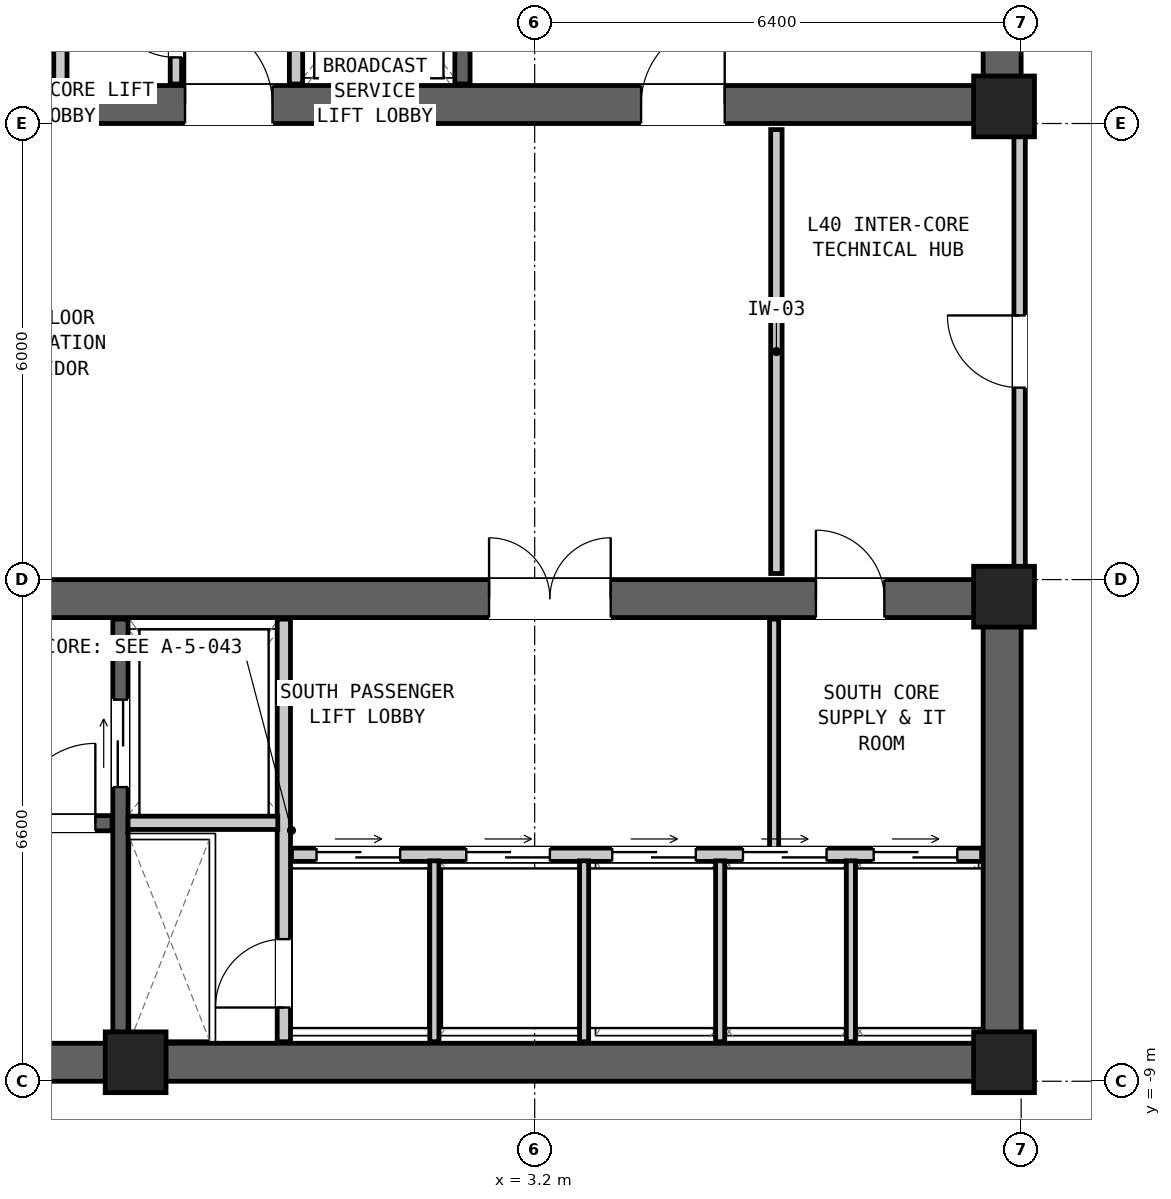
"""IFC4 building model, lengths in metres.
Left out: names, types, materials, properties, quantities, classifications, styles, units other than length and angle.
Written with IfcOpenShell. Run it as: python <this file> out.ifc"""

import sys

from ifc_helpers import new_model, si_unit, direction, frame, frame_2d, origin, origin_2d, place, context, subcontext, project, spatial, rectangle, extrude, element, fill, save


model = new_model("IFC4")
c1 = context("Model", 3, precision=1e-05, world=origin(), true_north=direction((0.0, 1.0)))
c2 = subcontext(c1, "Body", "Model", "MODEL_VIEW")
j1 = project(units=[si_unit("LENGTHUNIT", "METRE"), si_unit("PLANEANGLEUNIT", "RADIAN")], contexts=[c1])
p1 = place(None, origin())
s1 = spatial("IfcSite", under=j1, at=p1, CompositionType="ELEMENT")
p2 = place(p1, origin())
s2 = spatial("IfcBuilding", under=s1, at=p2, CompositionType="ELEMENT")
p3 = place(p2, frame((0.0, 0.0, 137.2)))
s3 = spatial("IfcBuildingStorey", under=s2, at=p3, CompositionType="ELEMENT", Elevation=137.2)
p4 = place(p3, frame((-9.6, 3.85, 0.0), z_axis=(0.0, 0.0, 1.0), x_axis=(1.0, 0.0, 0.0)))
e1 = element("IfcWall", 1, at=p4, inside=s3, PredefinedType="SHEAR", context=c2, shape_type="SweptSolid", body=[
    extrude(rectangle(XDim=19.2, YDim=0.5, at=frame_2d((9.6, 0.0))), origin(), (0.0, 0.0, 1.0), 3.05),
])
p5 = place(p4, frame((14.2, 0.0, 0.0)))
e2 = element("IfcOpeningElement", 2, at=p5, cuts=e1, PredefinedType="OPENING", context=c2, shape_type="SweptSolid", body=[
    extrude(rectangle(XDim=1.1, YDim=2.08, at=frame_2d((0.55, 1.04))), frame((0.0, 0.262, 0.0), z_axis=(0.0, -1.0, 0.0), x_axis=(1.0, 0.0, 0.0)), (0.0, 0.0, 1.0), 0.524),
])
p6 = place(p4, frame((8.2, 0.0, 0.0)))
e3 = element("IfcOpeningElement", 3, at=p6, cuts=e1, PredefinedType="OPENING", context=c2, shape_type="SweptSolid", body=[
    extrude(rectangle(XDim=1.15, YDim=2.1, at=frame_2d((0.575, 1.05))), frame((0.0, 0.262, 0.0), z_axis=(0.0, -1.0, 0.0), x_axis=(1.0, 0.0, 0.0)), (0.0, 0.0, 1.0), 0.524),
])
p7 = place(p4, frame((2.5, 0.0, 0.0)))
e4 = element("IfcOpeningElement", 4, at=p7, cuts=e1, PredefinedType="OPENING", context=c2, shape_type="SweptSolid", body=[
    extrude(rectangle(XDim=1.6, YDim=2.12, at=frame_2d((0.8, 1.06))), frame((0.0, 0.262, 0.0), z_axis=(0.0, -1.0, 0.0), x_axis=(1.0, 0.0, 0.0)), (0.0, 0.0, 1.0), 0.524),
])
p8 = place(p3, frame((9.35, 3.6, 0.0), z_axis=(0.0, 0.0, 1.0), x_axis=(0.0, 1.0, 0.0)))
e5 = element("IfcWall", 5, at=p8, inside=s3, PredefinedType="SHEAR", context=c2, shape_type="SweptSolid", body=[
    extrude(rectangle(XDim=6.6, YDim=0.5, at=frame_2d((3.3, 0.0))), origin(), (0.0, 0.0, 1.0), 3.05),
])
p9 = place(p3, frame((-9.6, -8.75, 0.0), z_axis=(0.0, 0.0, 1.0), x_axis=(1.0, 0.0, 0.0)))
e6 = element("IfcWall", 6, at=p9, inside=s3, PredefinedType="SHEAR", context=c2, shape_type="SweptSolid", body=[
    extrude(rectangle(XDim=19.2, YDim=0.5, at=frame_2d((9.6, 0.0))), origin(), (0.0, 0.0, 1.0), 3.05),
])
p10 = place(p3, frame((-9.6, -2.65, 0.0), z_axis=(0.0, 0.0, 1.0), x_axis=(1.0, 0.0, 0.0)))
e7 = element("IfcWall", 7, at=p10, inside=s3, PredefinedType="SHEAR", context=c2, shape_type="SweptSolid", body=[
    extrude(rectangle(XDim=19.2, YDim=0.5, at=frame_2d((9.6, 0.0))), origin(), (0.0, 0.0, 1.0), 3.05),
])
p11 = place(p10, frame((3.8, 0.0, 0.0)))
e8 = element("IfcOpeningElement", 8, at=p11, cuts=e7, PredefinedType="OPENING", context=c2, shape_type="SweptSolid", body=[
    extrude(rectangle(XDim=1.1, YDim=2.08, at=frame_2d((0.55, 1.04))), frame((0.0, 0.262, 0.0), z_axis=(0.0, -1.0, 0.0), x_axis=(1.0, 0.0, 0.0)), (0.0, 0.0, 1.0), 0.524),
])
p12 = place(p10, frame((12.2, 0.0, 0.0)))
e9 = element("IfcOpeningElement", 9, at=p12, cuts=e7, PredefinedType="OPENING", context=c2, shape_type="SweptSolid", body=[
    extrude(rectangle(XDim=1.6, YDim=2.12, at=frame_2d((0.8, 1.06))), frame((0.0, 0.262, 0.0), z_axis=(0.0, -1.0, 0.0), x_axis=(1.0, 0.0, 0.0)), (0.0, 0.0, 1.0), 0.524),
])
p13 = place(p10, frame((16.5, 0.0, 0.0)))
e10 = element("IfcOpeningElement", 10, at=p13, cuts=e7, PredefinedType="OPENING", context=c2, shape_type="SweptSolid", body=[
    extrude(rectangle(XDim=0.9, YDim=2.05, at=frame_2d((0.45, 1.025))), frame((0.0, 0.262, 0.0), z_axis=(0.0, -1.0, 0.0), x_axis=(1.0, 0.0, 0.0)), (0.0, 0.0, 1.0), 0.524),
])
p14 = place(p3, frame((9.35, -9.0, 0.0), z_axis=(0.0, 0.0, 1.0), x_axis=(0.0, 1.0, 0.0)))
e11 = element("IfcWall", 11, at=p14, inside=s3, PredefinedType="SHEAR", context=c2, shape_type="SweptSolid", body=[
    extrude(rectangle(XDim=6.6, YDim=0.5, at=frame_2d((3.3, 0.0))), origin(), (0.0, 0.0, 1.0), 3.05),
])
for number, where, z_axis, x_axis in (
    (12, (9.375, 3.825, 0.0), (0.0, 0.0, 1.0), (1.0, 0.0, 0.0)),
    (13, (9.375, -2.625, 0.0), (0.0, 0.0, 1.0), (1.0, 0.0, 0.0)),
    (14, (-2.05, -8.75, 0.0), (0.0, 0.0, 1.0), (1.0, 0.0, 0.0)),
    (15, (9.375, -8.75, 0.0), (0.0, 0.0, 1.0), (1.0, 0.0, 0.0)),
):
    element("IfcColumn", number, at=place(p3, frame(where, z_axis=z_axis, x_axis=x_axis)), inside=s3, PredefinedType="COLUMN", context=c2, shape_type="SweptSolid", body=[
        extrude(rectangle(XDim=0.8, YDim=0.8, at=origin_2d()), origin(), (0.0, 0.0, 1.0), 3.05),
    ])
p15 = place(p3, frame((2.25, 4.12, 0.0), z_axis=(0.0, 0.0, 1.0), x_axis=(0.0, 1.0, 0.0)))
e16 = element("IfcWall", 16, at=p15, inside=s3, PredefinedType="SHEAR", context=c2, shape_type="SweptSolid", body=[
    extrude(rectangle(XDim=5.56, YDim=0.2, at=frame_2d((2.78, 0.0))), origin(), (0.0, 0.0, 1.0), 2.83),
])
p16 = place(p15, frame((0.65, 0.0, 0.0)))
e17 = element("IfcOpeningElement", 17, at=p16, cuts=e16, PredefinedType="OPENING", context=c2, shape_type="SweptSolid", body=[
    extrude(rectangle(XDim=1.15, YDim=2.08, at=frame_2d((0.575, 1.04))), frame((0.0, 0.112, 0.0), z_axis=(0.0, -1.0, 0.0), x_axis=(1.0, 0.0, 0.0)), (0.0, 0.0, 1.0), 0.224),
])
p17 = place(p3, frame((0.06, 4.12, 0.0), z_axis=(0.0, 0.0, 1.0), x_axis=(0.0, 1.0, 0.0)))
e18 = element("IfcWall", 18, at=p17, inside=s3, PredefinedType="PARTITIONING", context=c2, shape_type="SweptSolid", body=[
    extrude(rectangle(XDim=5.56, YDim=0.175, at=frame_2d((2.78, 0.0))), origin(), (0.0, 0.0, 1.0), 2.83),
])
p18 = place(p17, frame((3.1, 0.0, 0.0)))
e19 = element("IfcOpeningElement", 19, at=p18, cuts=e18, PredefinedType="OPENING", context=c2, shape_type="SweptSolid", body=[
    extrude(rectangle(XDim=1.4, YDim=2.12, at=frame_2d((0.7, 1.06))), frame((0.0, 0.1, 0.0), z_axis=(0.0, -1.0, 0.0), x_axis=(1.0, 0.0, 0.0)), (0.0, 0.0, 1.0), 0.199),
])
p19 = place(p3, frame((-3.04, 4.12, 0.0), z_axis=(0.0, 0.0, 1.0), x_axis=(0.0, 1.0, 0.0)))
e20 = element("IfcWall", 20, at=p19, inside=s3, PredefinedType="PARTITIONING", context=c2, shape_type="SweptSolid", body=[
    extrude(rectangle(XDim=5.56, YDim=0.175, at=frame_2d((2.78, 0.0))), origin(), (0.0, 0.0, 1.0), 2.83),
])
p20 = place(p3, frame((-1.52, 4.12, 0.0), z_axis=(0.0, 0.0, 1.0), x_axis=(0.0, 1.0, 0.0)))
e21 = element("IfcWall", 21, at=p20, inside=s3, PredefinedType="PARTITIONING", context=c2, shape_type="SweptSolid", body=[
    extrude(rectangle(XDim=5.56, YDim=0.15, at=frame_2d((2.78, 0.0))), origin(), (0.0, 0.0, 1.0), 2.83),
])
p21 = place(p20, frame((3.95, 0.0, 0.0)))
e22 = element("IfcOpeningElement", 22, at=p21, cuts=e21, PredefinedType="OPENING", context=c2, shape_type="SweptSolid", body=[
    extrude(rectangle(XDim=0.9, YDim=2.05, at=frame_2d((0.45, 1.025))), frame((0.0, 0.087, 0.0), z_axis=(0.0, -1.0, 0.0), x_axis=(1.0, 0.0, 0.0)), (0.0, 0.0, 1.0), 0.174),
])
p22 = place(p20, frame((2.2, 0.0, 0.0)))
e23 = element("IfcOpeningElement", 23, at=p22, cuts=e21, PredefinedType="OPENING", context=c2, shape_type="SweptSolid", body=[
    extrude(rectangle(XDim=0.9, YDim=2.05, at=frame_2d((0.45, 1.025))), frame((0.0, 0.087, 0.0), z_axis=(0.0, -1.0, 0.0), x_axis=(1.0, 0.0, 0.0)), (0.0, 0.0, 1.0), 0.174),
])
p23 = place(p20, frame((0.35, 0.0, 0.0)))
e24 = element("IfcOpeningElement", 24, at=p23, cuts=e21, PredefinedType="OPENING", context=c2, shape_type="SweptSolid", body=[
    extrude(rectangle(XDim=0.92, YDim=2.1, at=frame_2d((0.46, 1.05))), frame((0.0, 0.087, 0.0), z_axis=(0.0, -1.0, 0.0), x_axis=(1.0, 0.0, 0.0)), (0.0, 0.0, 1.0), 0.174),
])
p24 = place(p3, frame((-9.08, -5.605, 0.0), z_axis=(0.0, 0.0, 1.0), x_axis=(1.0, 0.0, 0.0)))
e25 = element("IfcWall", 25, at=p24, inside=s3, PredefinedType="SHEAR", context=c2, shape_type="SweptSolid", body=[
    extrude(rectangle(XDim=6.72, YDim=0.2, at=frame_2d((3.36, 0.0))), origin(), (0.0, 0.0, 1.0), 2.83),
])
p25 = place(p24, frame((5.45, 0.0, 0.0)))
e26 = element("IfcOpeningElement", 26, at=p25, cuts=e25, PredefinedType="OPENING", context=c2, shape_type="SweptSolid", body=[
    extrude(rectangle(XDim=1.05, YDim=2.08, at=frame_2d((0.525, 1.04))), frame((0.0, 0.112, 0.0), z_axis=(0.0, -1.0, 0.0), x_axis=(1.0, 0.0, 0.0)), (0.0, 0.0, 1.0), 0.224),
])
p26 = place(p3, frame((-2.25, -8.48, 0.0), z_axis=(0.0, 0.0, 1.0), x_axis=(0.0, 1.0, 0.0)))
e27 = element("IfcWall", 27, at=p26, inside=s3, PredefinedType="SHEAR", context=c2, shape_type="SweptSolid", body=[
    extrude(rectangle(XDim=5.56, YDim=0.2, at=frame_2d((2.78, 0.0))), origin(), (0.0, 0.0, 1.0), 2.83),
])
p27 = place(p26, frame((3.35, 0.0, 0.0)))
e28 = element("IfcOpeningElement", 28, at=p27, cuts=e27, PredefinedType="OPENING", context=c2, shape_type="SweptSolid", body=[
    extrude(rectangle(XDim=1.15, YDim=2.08, at=frame_2d((0.575, 1.04))), frame((0.0, 0.112, 0.0), z_axis=(0.0, -1.0, 0.0), x_axis=(1.0, 0.0, 0.0)), (0.0, 0.0, 1.0), 0.224),
])
p28 = place(p3, frame((-0.1, -8.48, 0.0), z_axis=(0.0, 0.0, 1.0), x_axis=(0.0, 1.0, 0.0)))
e29 = element("IfcWall", 29, at=p28, inside=s3, PredefinedType="PARTITIONING", context=c2, shape_type="SweptSolid", body=[
    extrude(rectangle(XDim=5.56, YDim=0.175, at=frame_2d((2.78, 0.0))), origin(), (0.0, 0.0, 1.0), 2.83),
])
p29 = place(p28, frame((0.45, 0.0, 0.0)))
e30 = element("IfcOpeningElement", 30, at=p29, cuts=e29, PredefinedType="OPENING", context=c2, shape_type="SweptSolid", body=[
    extrude(rectangle(XDim=0.9, YDim=2.05, at=frame_2d((0.45, 1.025))), frame((0.0, 0.1, 0.0), z_axis=(0.0, -1.0, 0.0), x_axis=(1.0, 0.0, 0.0)), (0.0, 0.0, 1.0), 0.199),
])
p30 = place(p3, frame((-2.15, -5.6, 0.0), z_axis=(0.0, 0.0, 1.0), x_axis=(1.0, 0.0, 0.0)))
e31 = element("IfcWall", 31, at=p30, inside=s3, PredefinedType="PARTITIONING", context=c2, shape_type="SweptSolid", body=[
    extrude(rectangle(XDim=1.97, YDim=0.175, at=frame_2d((0.985, 0.0))), origin(), (0.0, 0.0, 1.0), 2.83),
])
p31 = place(p3, frame((0.0, -6.02, 0.0), z_axis=(0.0, 0.0, 1.0), x_axis=(1.0, 0.0, 0.0)))
e32 = element("IfcWall", 32, at=p31, inside=s3, PredefinedType="PARTITIONING", context=c2, shape_type="SweptSolid", body=[
    extrude(rectangle(XDim=9.08, YDim=0.175, at=frame_2d((4.54, 0.0))), origin(), (0.0, 0.0, 1.0), 2.83),
])
p32 = place(p31, frame((0.33, 0.0, 0.0)))
e33 = element("IfcOpeningElement", 33, at=p32, cuts=e32, PredefinedType="OPENING", context=c2, shape_type="SweptSolid", body=[
    extrude(rectangle(XDim=1.1, YDim=2.06, at=frame_2d((0.55, 1.03))), frame((0.0, 0.1, 0.0), z_axis=(0.0, -1.0, 0.0), x_axis=(1.0, 0.0, 0.0)), (0.0, 0.0, 1.0), 0.199),
])
p33 = place(p31, frame((2.3, 0.0, 0.0)))
e34 = element("IfcOpeningElement", 34, at=p33, cuts=e32, PredefinedType="OPENING", context=c2, shape_type="SweptSolid", body=[
    extrude(rectangle(XDim=1.1, YDim=2.06, at=frame_2d((0.55, 1.03))), frame((0.0, 0.1, 0.0), z_axis=(0.0, -1.0, 0.0), x_axis=(1.0, 0.0, 0.0)), (0.0, 0.0, 1.0), 0.199),
])
p34 = place(p31, frame((4.22, 0.0, 0.0)))
e35 = element("IfcOpeningElement", 35, at=p34, cuts=e32, PredefinedType="OPENING", context=c2, shape_type="SweptSolid", body=[
    extrude(rectangle(XDim=1.1, YDim=2.06, at=frame_2d((0.55, 1.03))), frame((0.0, 0.1, 0.0), z_axis=(0.0, -1.0, 0.0), x_axis=(1.0, 0.0, 0.0)), (0.0, 0.0, 1.0), 0.199),
])
p35 = place(p31, frame((5.94, 0.0, 0.0)))
e36 = element("IfcOpeningElement", 36, at=p35, cuts=e32, PredefinedType="OPENING", context=c2, shape_type="SweptSolid", body=[
    extrude(rectangle(XDim=1.1, YDim=2.06, at=frame_2d((0.55, 1.03))), frame((0.0, 0.1, 0.0), z_axis=(0.0, -1.0, 0.0), x_axis=(1.0, 0.0, 0.0)), (0.0, 0.0, 1.0), 0.199),
])
p36 = place(p31, frame((7.66, 0.0, 0.0)))
e37 = element("IfcOpeningElement", 37, at=p36, cuts=e32, PredefinedType="OPENING", context=c2, shape_type="SweptSolid", body=[
    extrude(rectangle(XDim=1.1, YDim=2.06, at=frame_2d((0.55, 1.03))), frame((0.0, 0.1, 0.0), z_axis=(0.0, -1.0, 0.0), x_axis=(1.0, 0.0, 0.0)), (0.0, 0.0, 1.0), 0.199),
])
for number, where, z_axis, x_axis in (
    (38, (1.88, -8.48, 0.0), (0.0, 0.0, 1.0), (0.0, 1.0, 0.0)),
    (39, (3.85, -8.48, 0.0), (0.0, 0.0, 1.0), (0.0, 1.0, 0.0)),
    (40, (5.64, -8.48, 0.0), (0.0, 0.0, 1.0), (0.0, 1.0, 0.0)),
    (41, (7.36, -8.48, 0.0), (0.0, 0.0, 1.0), (0.0, 1.0, 0.0)),
):
    element("IfcWall", number, at=place(p3, frame(where, z_axis=z_axis, x_axis=x_axis)), inside=s3, PredefinedType="PARTITIONING", context=c2, shape_type="SweptSolid", body=[
        extrude(rectangle(XDim=2.38, YDim=0.12, at=frame_2d((1.19, 0.0))), origin(), (0.0, 0.0, 1.0), 2.83),
    ])
p37 = place(p3, frame((6.35, -5.94, 0.0), z_axis=(0.0, 0.0, 1.0), x_axis=(0.0, 1.0, 0.0)))
e42 = element("IfcWall", 42, at=p37, inside=s3, PredefinedType="PARTITIONING", context=c2, shape_type="SweptSolid", body=[
    extrude(rectangle(XDim=3.02, YDim=0.12, at=frame_2d((1.51, 0.0))), origin(), (0.0, 0.0, 1.0), 2.83),
])
p38 = place(p3, frame((6.38, -2.32, 0.0), z_axis=(0.0, 0.0, 1.0), x_axis=(0.0, 1.0, 0.0)))
e43 = element("IfcWall", 43, at=p38, inside=s3, PredefinedType="PARTITIONING", context=c2, shape_type="SweptSolid", body=[
    extrude(rectangle(XDim=5.84, YDim=0.15, at=frame_2d((2.92, 0.0))), origin(), (0.0, 0.0, 1.0), 2.198),
])
p39 = place(p3, frame((9.58, -2.32, 0.0), z_axis=(0.0, 0.0, 1.0), x_axis=(0.0, 1.0, 0.0)))
e44 = element("IfcWall", 44, at=p39, inside=s3, PredefinedType="PARTITIONING", context=c2, shape_type="SweptSolid", body=[
    extrude(rectangle(XDim=5.84, YDim=0.15, at=frame_2d((2.92, 0.0))), origin(), (0.0, 0.0, 1.0), 2.198),
])
p40 = place(p39, frame((2.445, 0.0, 0.0)))
e45 = element("IfcOpeningElement", 45, at=p40, cuts=e44, PredefinedType="OPENING", context=c2, shape_type="SweptSolid", body=[
    extrude(rectangle(XDim=0.95, YDim=2.1, at=frame_2d((0.475, 1.05))), frame((0.0, 0.087, 0.0), z_axis=(0.0, -1.0, 0.0), x_axis=(1.0, 0.0, 0.0)), (0.0, 0.0, 1.0), 0.174),
])
p41 = place(p5, origin())
e46 = element("IfcDoor", 46, at=p41, inside=s3, OperationType="SINGLE_SWING_RIGHT", PredefinedType="DOOR", context=c2, shape_type="SweptSolid", body=[
    extrude(rectangle(XDim=1.1, YDim=2.08, at=frame_2d((0.55, 1.04))), frame((0.0, 0.025, 0.0), z_axis=(0.0, -1.0, 0.0), x_axis=(1.0, 0.0, 0.0)), (0.0, 0.0, 1.0), 0.05),
])
fill(e2, e46)
p42 = place(p6, origin())
e47 = element("IfcDoor", 47, at=p42, inside=s3, OperationType="SINGLE_SWING_LEFT", PredefinedType="DOOR", context=c2, shape_type="SweptSolid", body=[
    extrude(rectangle(XDim=1.15, YDim=2.1, at=frame_2d((0.575, 1.05))), frame((0.0, 0.025, 0.0), z_axis=(0.0, -1.0, 0.0), x_axis=(1.0, 0.0, 0.0)), (0.0, 0.0, 1.0), 0.05),
])
fill(e3, e47)
p43 = place(p23, origin())
e48 = element("IfcDoor", 48, at=p43, inside=s3, OperationType="SINGLE_SWING_RIGHT", PredefinedType="DOOR", context=c2, shape_type="SweptSolid", body=[
    extrude(rectangle(XDim=0.92, YDim=2.1, at=frame_2d((0.46, 1.05))), frame((0.0, 0.025, 0.0), z_axis=(0.0, -1.0, 0.0), x_axis=(1.0, 0.0, 0.0)), (0.0, 0.0, 1.0), 0.05),
])
fill(e24, e48)
p44 = place(p25, origin())
e49 = element("IfcDoor", 49, at=p44, inside=s3, OperationType="SINGLE_SWING_RIGHT", PredefinedType="DOOR", context=c2, shape_type="SweptSolid", body=[
    extrude(rectangle(XDim=1.05, YDim=2.08, at=frame_2d((0.525, 1.04))), frame((0.0, 0.025, 0.0), z_axis=(0.0, -1.0, 0.0), x_axis=(1.0, 0.0, 0.0)), (0.0, 0.0, 1.0), 0.05),
])
fill(e26, e49)
p45 = place(p27, origin())
e50 = element("IfcDoor", 50, at=p45, inside=s3, OperationType="DOUBLE_DOOR_SLIDING", PredefinedType="DOOR", context=c2, shape_type="SweptSolid", body=[
    extrude(rectangle(XDim=1.15, YDim=2.08, at=frame_2d((0.575, 1.04))), frame((0.0, 0.025, 0.0), z_axis=(0.0, -1.0, 0.0), x_axis=(1.0, 0.0, 0.0)), (0.0, 0.0, 1.0), 0.05),
])
fill(e28, e50)
p46 = place(p29, origin())
e51 = element("IfcDoor", 51, at=p46, inside=s3, OperationType="SINGLE_SWING_LEFT", PredefinedType="DOOR", context=c2, shape_type="SweptSolid", body=[
    extrude(rectangle(XDim=0.9, YDim=2.05, at=frame_2d((0.45, 1.025))), frame((0.0, 0.025, 0.0), z_axis=(0.0, -1.0, 0.0), x_axis=(1.0, 0.0, 0.0)), (0.0, 0.0, 1.0), 0.05),
])
fill(e30, e51)
p47 = place(p32, origin())
e52 = element("IfcDoor", 52, at=p47, inside=s3, OperationType="DOUBLE_DOOR_SLIDING", PredefinedType="DOOR", context=c2, shape_type="SweptSolid", body=[
    extrude(rectangle(XDim=1.1, YDim=2.06, at=frame_2d((0.55, 1.03))), frame((0.0, 0.025, 0.0), z_axis=(0.0, -1.0, 0.0), x_axis=(1.0, 0.0, 0.0)), (0.0, 0.0, 1.0), 0.05),
])
fill(e33, e52)
p48 = place(p33, origin())
e53 = element("IfcDoor", 53, at=p48, inside=s3, OperationType="DOUBLE_DOOR_SLIDING", PredefinedType="DOOR", context=c2, shape_type="SweptSolid", body=[
    extrude(rectangle(XDim=1.1, YDim=2.06, at=frame_2d((0.55, 1.03))), frame((0.0, 0.025, 0.0), z_axis=(0.0, -1.0, 0.0), x_axis=(1.0, 0.0, 0.0)), (0.0, 0.0, 1.0), 0.05),
])
fill(e34, e53)
p49 = place(p12, origin())
e54 = element("IfcDoor", 54, at=p49, inside=s3, OperationType="DOUBLE_DOOR_SINGLE_SWING", PredefinedType="DOOR", context=c2, shape_type="SweptSolid", body=[
    extrude(rectangle(XDim=1.6, YDim=2.12, at=frame_2d((0.8, 1.06))), frame((0.0, 0.025, 0.0), z_axis=(0.0, -1.0, 0.0), x_axis=(1.0, 0.0, 0.0)), (0.0, 0.0, 1.0), 0.05),
])
fill(e9, e54)
p50 = place(p13, origin())
e55 = element("IfcDoor", 55, at=p50, inside=s3, OperationType="SINGLE_SWING_LEFT", PredefinedType="DOOR", context=c2, shape_type="SweptSolid", body=[
    extrude(rectangle(XDim=0.9, YDim=2.05, at=frame_2d((0.45, 1.025))), frame((0.0, 0.025, 0.0), z_axis=(0.0, -1.0, 0.0), x_axis=(1.0, 0.0, 0.0)), (0.0, 0.0, 1.0), 0.05),
])
fill(e10, e55)
p51 = place(p40, origin())
e56 = element("IfcDoor", 56, at=p51, inside=s3, OperationType="SINGLE_SWING_RIGHT", PredefinedType="DOOR", context=c2, shape_type="SweptSolid", body=[
    extrude(rectangle(XDim=0.95, YDim=2.1, at=frame_2d((0.475, 1.05))), frame((0.0, 0.025, 0.0), z_axis=(0.0, -1.0, 0.0), x_axis=(1.0, 0.0, 0.0)), (0.0, 0.0, 1.0), 0.05),
])
fill(e45, e56)
p52 = place(p34, origin())
e57 = element("IfcDoor", 57, at=p52, inside=s3, OperationType="DOUBLE_DOOR_SLIDING", PredefinedType="DOOR", context=c2, shape_type="SweptSolid", body=[
    extrude(rectangle(XDim=1.1, YDim=2.06, at=frame_2d((0.55, 1.03))), frame((0.0, 0.025, 0.0), z_axis=(0.0, -1.0, 0.0), x_axis=(1.0, 0.0, 0.0)), (0.0, 0.0, 1.0), 0.05),
])
fill(e35, e57)
p53 = place(p35, origin())
e58 = element("IfcDoor", 58, at=p53, inside=s3, OperationType="DOUBLE_DOOR_SLIDING", PredefinedType="DOOR", context=c2, shape_type="SweptSolid", body=[
    extrude(rectangle(XDim=1.1, YDim=2.06, at=frame_2d((0.55, 1.03))), frame((0.0, 0.025, 0.0), z_axis=(0.0, -1.0, 0.0), x_axis=(1.0, 0.0, 0.0)), (0.0, 0.0, 1.0), 0.05),
])
fill(e36, e58)
p54 = place(p36, origin())
e59 = element("IfcDoor", 59, at=p54, inside=s3, OperationType="DOUBLE_DOOR_SLIDING", PredefinedType="DOOR", context=c2, shape_type="SweptSolid", body=[
    extrude(rectangle(XDim=1.1, YDim=2.06, at=frame_2d((0.55, 1.03))), frame((0.0, 0.025, 0.0), z_axis=(0.0, -1.0, 0.0), x_axis=(1.0, 0.0, 0.0)), (0.0, 0.0, 1.0), 0.05),
])
fill(e37, e59)
save(model, sys.argv[1])
